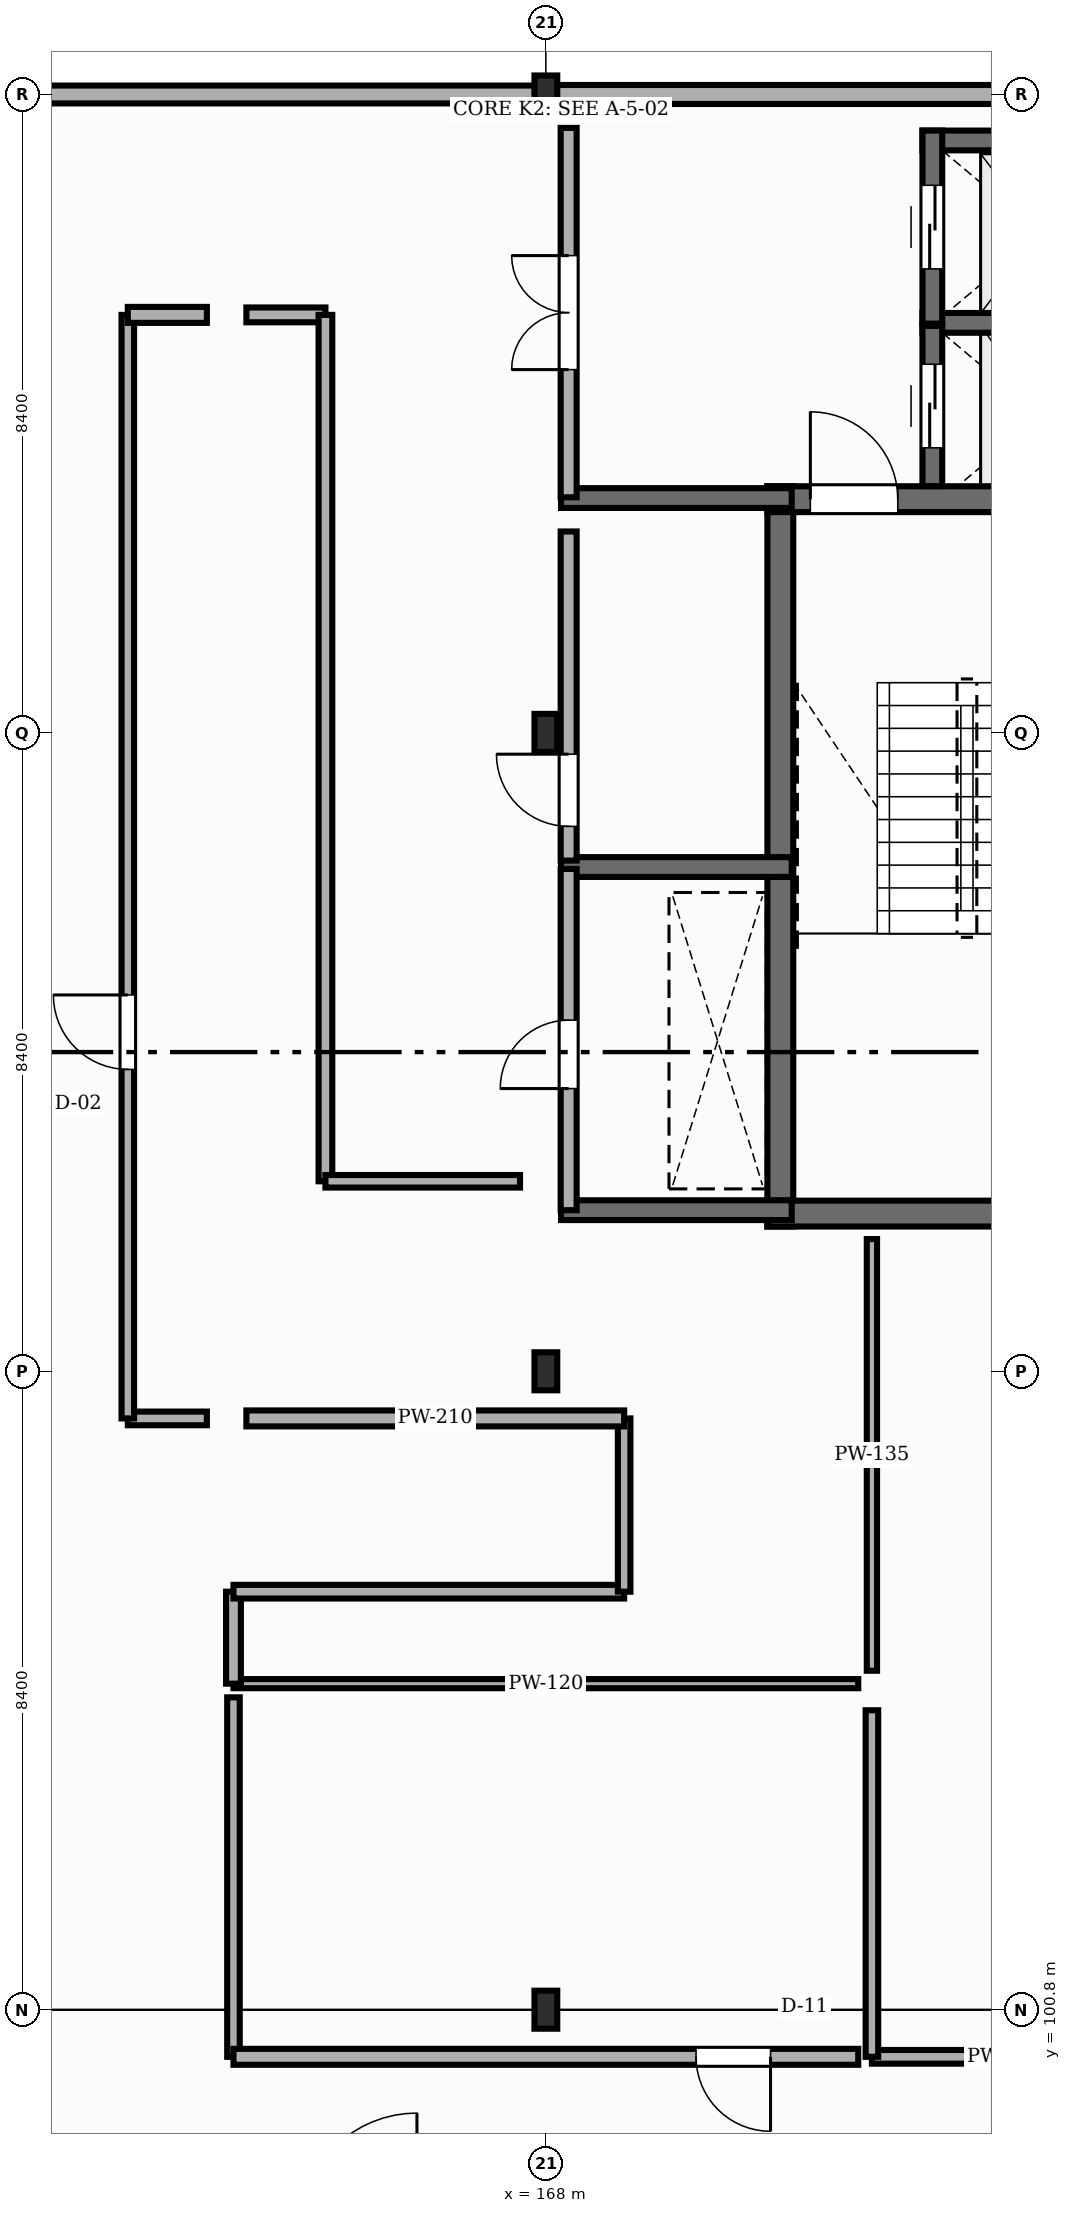
"""IFC4 building model, lengths in metres.
Left out: names, types, materials, properties, quantities, classifications, styles, units other than length and angle.
Written with IfcOpenShell. Run it as: python <this file> out.ifc"""

import sys

from ifc_helpers import new_model, si_unit, direction, frame, frame_2d, origin, origin_2d, place, context, subcontext, project, spatial, rectangle, i_section, extrude, element, fill, save


model = new_model("IFC4")
c1 = context("Model", 3, precision=1e-05, world=origin(), true_north=direction((0.0, 1.0)))
c2 = subcontext(c1, "Body", "Model", "MODEL_VIEW")
j1 = project(units=[si_unit("LENGTHUNIT", "METRE"), si_unit("PLANEANGLEUNIT", "RADIAN")], contexts=[c1])
p1 = place(None, origin())
s1 = spatial("IfcSite", under=j1, at=p1, CompositionType="ELEMENT")
p2 = place(p1, origin())
s2 = spatial("IfcBuilding", under=s1, at=p2, CompositionType="ELEMENT")
p3 = place(p2, frame((0.0, 0.0, 9.9)))
s3 = spatial("IfcBuildingStorey", under=s2, at=p3, CompositionType="ELEMENT", Elevation=9.9)
for number, where, z_axis, x_axis in (
    (1, (168.0, 100.8, 0.0), (0.0, 0.0, 1.0), (1.0, 0.0, 0.0)),
    (2, (168.0, 109.2, 0.0), (0.0, 0.0, 1.0), (1.0, 0.0, 0.0)),
    (3, (168.0, 117.6, 0.0), (0.0, 0.0, 1.0), (1.0, 0.0, 0.0)),
    (4, (168.0, 126.0, 0.0), (0.0, 0.0, 1.0), (1.0, 0.0, 0.0)),
):
    element("IfcColumn", number, at=place(p3, frame(where, z_axis=z_axis, x_axis=x_axis)), inside=s3, PredefinedType="COLUMN", context=c2, shape_type="SweptSolid", body=[
        extrude(i_section(OverallWidth=0.3, OverallDepth=0.5, WebThickness=0.014, FlangeThickness=0.028, FilletRadius=0.027, at=origin_2d()), origin(), (0.0, 0.0, 1.0), 4.05),
    ])
p4 = place(p3, frame((176.392, 126.0, 0.0), z_axis=(0.0, 0.0, 1.0), x_axis=(-1.0, 0.0, 0.0)))
e5 = element("IfcWall", 5, at=p4, inside=s3, PredefinedType="STANDARD", context=c2, shape_type="SweptSolid", body=[
    extrude(rectangle(XDim=8.384, YDim=0.25, at=frame_2d((4.192, 0.0))), origin(), (0.0, 0.0, 1.0), 3.502),
])
p5 = place(p3, frame((167.992, 126.0, 0.0), z_axis=(0.0, 0.0, 1.0), x_axis=(-1.0, 0.0, 0.0)))
e6 = element("IfcWall", 6, at=p5, inside=s3, PredefinedType="STANDARD", context=c2, shape_type="SweptSolid", body=[
    extrude(rectangle(XDim=8.384, YDim=0.235, at=frame_2d((4.192, 0.0))), origin(), (0.0, 0.0, 1.0), 3.472),
])
p6 = place(p3, frame((171.085, 111.105, 0.0), z_axis=(0.0, 0.0, 1.0), x_axis=(0.0, 1.0, 0.0)))
e7 = element("IfcWall", 7, at=p6, inside=s3, PredefinedType="SHEAR", context=c2, shape_type="SweptSolid", body=[
    extrude(rectangle(XDim=9.74, YDim=0.34, at=frame_2d((4.87, 0.0))), origin(), (0.0, 0.0, 1.0), 3.84),
])
p7 = place(p3, frame((170.915, 111.275, 0.0), z_axis=(0.0, 0.0, 1.0), x_axis=(1.0, 0.0, 0.0)))
e8 = element("IfcWall", 8, at=p7, inside=s3, PredefinedType="SHEAR", context=c2, shape_type="SweptSolid", body=[
    extrude(rectangle(XDim=5.25, YDim=0.34, at=frame_2d((2.625, 0.0))), origin(), (0.0, 0.0, 1.0), 3.84),
])
p8 = place(p3, frame((170.915, 120.675, 0.0), z_axis=(0.0, 0.0, 1.0), x_axis=(1.0, 0.0, 0.0)))
e9 = element("IfcWall", 9, at=p8, inside=s3, PredefinedType="SHEAR", context=c2, shape_type="SweptSolid", body=[
    extrude(rectangle(XDim=5.25, YDim=0.34, at=frame_2d((2.625, 0.0))), origin(), (0.0, 0.0, 1.0), 3.84),
])
p9 = place(p8, frame((0.565, 0.0, 0.0)))
e10 = element("IfcOpeningElement", 10, at=p9, cuts=e9, PredefinedType="OPENING", context=c2, shape_type="SweptSolid", body=[
    extrude(rectangle(XDim=1.15, YDim=2.15, at=frame_2d((0.575, 1.075))), frame((0.0, 0.18, 0.0), z_axis=(0.0, -1.0, 0.0), x_axis=(1.0, 0.0, 0.0)), (0.0, 0.0, 1.0), 0.36),
])
p10 = place(p3, frame((172.955, 122.995, 0.0), z_axis=(0.0, 0.0, 1.0), x_axis=(1.0, 0.0, 0.0)))
e11 = element("IfcWall", 11, at=p10, inside=s3, PredefinedType="SHEAR", context=c2, shape_type="SweptSolid", body=[
    extrude(rectangle(XDim=3.13, YDim=0.26, at=frame_2d((1.565, 0.0))), origin(), (0.0, 0.0, 1.0), 3.84),
])
p11 = place(p3, frame((173.085, 120.847, 0.0), z_axis=(0.0, 0.0, 1.0), x_axis=(0.0, 1.0, 0.0)))
e12 = element("IfcWall", 12, at=p11, inside=s3, PredefinedType="SHEAR", context=c2, shape_type="SweptSolid", body=[
    extrude(rectangle(XDim=2.108, YDim=0.26, at=frame_2d((1.054, 0.0))), origin(), (0.0, 0.0, 1.0), 3.84),
])
p12 = place(p11, frame((0.504, 0.0, 0.0)))
e13 = element("IfcOpeningElement", 13, at=p12, cuts=e12, PredefinedType="OPENING", context=c2, shape_type="SweptSolid", body=[
    extrude(rectangle(XDim=1.1, YDim=2.15, at=frame_2d((0.55, 1.075))), frame((0.0, 0.14, 0.0), z_axis=(0.0, -1.0, 0.0), x_axis=(1.0, 0.0, 0.0)), (0.0, 0.0, 1.0), 0.28),
])
p13 = place(p3, frame((172.955, 125.395, 0.0), z_axis=(0.0, 0.0, 1.0), x_axis=(1.0, 0.0, 0.0)))
e14 = element("IfcWall", 14, at=p13, inside=s3, PredefinedType="SHEAR", context=c2, shape_type="SweptSolid", body=[
    extrude(rectangle(XDim=3.13, YDim=0.26, at=frame_2d((1.565, 0.0))), origin(), (0.0, 0.0, 1.0), 3.84),
])
p14 = place(p3, frame((173.085, 122.985, 0.0), z_axis=(0.0, 0.0, 1.0), x_axis=(0.0, 1.0, 0.0)))
e15 = element("IfcWall", 15, at=p14, inside=s3, PredefinedType="SHEAR", context=c2, shape_type="SweptSolid", body=[
    extrude(rectangle(XDim=2.54, YDim=0.26, at=frame_2d((1.27, 0.0))), origin(), (0.0, 0.0, 1.0), 3.84),
])
p15 = place(p14, frame((0.72, 0.0, 0.0)))
e16 = element("IfcOpeningElement", 16, at=p15, cuts=e15, PredefinedType="OPENING", context=c2, shape_type="SweptSolid", body=[
    extrude(rectangle(XDim=1.1, YDim=2.15, at=frame_2d((0.55, 1.075))), frame((0.0, 0.14, 0.0), z_axis=(0.0, -1.0, 0.0), x_axis=(1.0, 0.0, 0.0)), (0.0, 0.0, 1.0), 0.28),
])
for number, where, z_axis, x_axis in (
    (17, (168.2, 111.32, 0.0), (0.0, 0.0, 1.0), (1.0, 0.0, 0.0)),
    (18, (168.2, 115.835, 0.0), (0.0, 0.0, 1.0), (1.0, 0.0, 0.0)),
    (19, (168.2, 120.69, 0.0), (0.0, 0.0, 1.0), (1.0, 0.0, 0.0)),
):
    element("IfcWall", number, at=place(p3, frame(where, z_axis=z_axis, x_axis=x_axis)), inside=s3, PredefinedType="SHEAR", context=c2, shape_type="SweptSolid", body=[
        extrude(rectangle(XDim=3.035, YDim=0.26, at=frame_2d((1.518, 0.0))), origin(), (0.0, 0.0, 1.0), 3.84),
    ])
p16 = place(p3, frame((168.3, 111.32, 0.0), z_axis=(0.0, 0.0, 1.0), x_axis=(0.0, 1.0, 0.0)))
e20 = element("IfcWall", 20, at=p16, inside=s3, PredefinedType="STANDARD", context=c2, shape_type="SweptSolid", body=[
    extrude(rectangle(XDim=4.49, YDim=0.21, at=frame_2d((2.245, 0.0))), origin(), (0.0, 0.0, 1.0), 3.432),
])
p17 = place(p16, frame((1.6, 0.0, 0.0)))
e21 = element("IfcOpeningElement", 21, at=p17, cuts=e20, PredefinedType="OPENING", context=c2, shape_type="SweptSolid", body=[
    extrude(rectangle(XDim=0.9, YDim=2.1, at=frame_2d((0.45, 1.05))), frame((0.0, 0.115, 0.0), z_axis=(0.0, -1.0, 0.0), x_axis=(1.0, 0.0, 0.0)), (0.0, 0.0, 1.0), 0.23),
])
p18 = place(p3, frame((168.3, 115.92, 0.0), z_axis=(0.0, 0.0, 1.0), x_axis=(0.0, 1.0, 0.0)))
e22 = element("IfcWall", 22, at=p18, inside=s3, PredefinedType="STANDARD", context=c2, shape_type="SweptSolid", body=[
    extrude(rectangle(XDim=4.33, YDim=0.21, at=frame_2d((2.165, 0.0))), origin(), (0.0, 0.0, 1.0), 3.432),
])
p19 = place(p18, frame((0.45, 0.0, 0.0)))
e23 = element("IfcOpeningElement", 23, at=p19, cuts=e22, PredefinedType="OPENING", context=c2, shape_type="SweptSolid", body=[
    extrude(rectangle(XDim=0.95, YDim=2.15, at=frame_2d((0.475, 1.075))), frame((0.0, 0.115, 0.0), z_axis=(0.0, -1.0, 0.0), x_axis=(1.0, 0.0, 0.0)), (0.0, 0.0, 1.0), 0.23),
])
p20 = place(p3, frame((168.3, 120.7, 0.0), z_axis=(0.0, 0.0, 1.0), x_axis=(0.0, 1.0, 0.0)))
e24 = element("IfcWall", 24, at=p20, inside=s3, PredefinedType="STANDARD", context=c2, shape_type="SweptSolid", body=[
    extrude(rectangle(XDim=4.86, YDim=0.21, at=frame_2d((2.43, 0.0))), origin(), (0.0, 0.0, 1.0), 3.482),
])
p21 = place(p20, frame((1.68, 0.0, 0.0)))
e25 = element("IfcOpeningElement", 25, at=p21, cuts=e24, PredefinedType="OPENING", context=c2, shape_type="SweptSolid", body=[
    extrude(rectangle(XDim=1.5, YDim=2.2, at=frame_2d((0.75, 1.1))), frame((0.0, 0.115, 0.0), z_axis=(0.0, -1.0, 0.0), x_axis=(1.0, 0.0, 0.0)), (0.0, 0.0, 1.0), 0.23),
])
p22 = place(p3, frame((175.78, 100.18, -0.004), z_axis=(0.0, 0.0, 1.0), x_axis=(-1.0, 0.0, 0.0)))
e26 = element("IfcWall", 26, at=p22, inside=s3, PredefinedType="STANDARD", context=c2, shape_type="SweptSolid", body=[
    extrude(rectangle(XDim=3.49, YDim=0.18, at=frame_2d((1.745, 0.0))), origin(), (0.0, 0.0, 1.0), 3.844),
])
p23 = place(p3, frame((172.29, 100.18, -0.004), z_axis=(0.0, 0.0, 1.0), x_axis=(0.0, 1.0, 0.0)))
e27 = element("IfcWall", 27, at=p23, inside=s3, PredefinedType="STANDARD", context=c2, shape_type="SweptSolid", body=[
    extrude(rectangle(XDim=4.56, YDim=0.165, at=frame_2d((2.28, 0.0))), origin(), (0.0, 0.0, 1.0), 3.844),
])
p24 = place(p3, frame((172.29, 105.26, -0.004), z_axis=(0.0, 0.0, 1.0), x_axis=(0.0, 1.0, 0.0)))
e28 = element("IfcWall", 28, at=p24, inside=s3, PredefinedType="STANDARD", context=c2, shape_type="SweptSolid", body=[
    extrude(rectangle(XDim=5.68, YDim=0.135, at=frame_2d((2.84, 0.0))), origin(), (0.0, 0.0, 1.0), 3.844),
])
p25 = place(p3, frame((163.54, 108.58, -0.004), z_axis=(0.0, 0.0, 1.0), x_axis=(-1.0, 0.0, 0.0)))
e29 = element("IfcWall", 29, at=p25, inside=s3, PredefinedType="STANDARD", context=c2, shape_type="SweptSolid", body=[
    extrude(rectangle(XDim=1.04, YDim=0.18, at=frame_2d((0.52, 0.0))), origin(), (0.0, 0.0, 1.0), 3.844),
])
p26 = place(p3, frame((162.5, 108.58, -0.004), z_axis=(0.0, 0.0, 1.0), x_axis=(0.0, 1.0, 0.0)))
e30 = element("IfcWall", 30, at=p26, inside=s3, PredefinedType="STANDARD", context=c2, shape_type="SweptSolid", body=[
    extrude(rectangle(XDim=14.52, YDim=0.165, at=frame_2d((7.26, 0.0))), origin(), (0.0, 0.0, 1.0), 3.536),
])
p27 = place(p26, frame((4.592, 0.0, 0.0)))
e31 = element("IfcOpeningElement", 31, at=p27, cuts=e30, PredefinedType="OPENING", context=c2, shape_type="SweptSolid", body=[
    extrude(rectangle(XDim=0.98, YDim=2.06, at=frame_2d((0.49, 1.03))), frame((0.0, 0.093, 0.0), z_axis=(0.0, -1.0, 0.0), x_axis=(1.0, 0.0, 0.0)), (0.0, 0.0, 1.0), 0.185),
])
p28 = place(p3, frame((162.5, 123.1, -0.004), z_axis=(0.0, 0.0, 1.0), x_axis=(1.0, 0.0, 0.0)))
e32 = element("IfcWall", 32, at=p28, inside=s3, PredefinedType="STANDARD", context=c2, shape_type="SweptSolid", body=[
    extrude(rectangle(XDim=1.04, YDim=0.21, at=frame_2d((0.52, 0.0))), origin(), (0.0, 0.0, 1.0), 3.844),
])
p29 = place(p3, frame((164.06, 123.1, -0.004), z_axis=(0.0, 0.0, 1.0), x_axis=(1.0, 0.0, 0.0)))
e33 = element("IfcWall", 33, at=p29, inside=s3, PredefinedType="STANDARD", context=c2, shape_type="SweptSolid", body=[
    extrude(rectangle(XDim=1.04, YDim=0.195, at=frame_2d((0.52, 0.0))), origin(), (0.0, 0.0, 1.0), 3.844),
])
p30 = place(p3, frame((165.1, 123.1, -0.004), z_axis=(0.0, 0.0, 1.0), x_axis=(0.0, -1.0, 0.0)))
e34 = element("IfcWall", 34, at=p30, inside=s3, PredefinedType="STANDARD", context=c2, shape_type="SweptSolid", body=[
    extrude(rectangle(XDim=11.4, YDim=0.18, at=frame_2d((5.7, 0.0))), origin(), (0.0, 0.0, 1.0), 3.536),
])
p31 = place(p3, frame((165.1, 111.7, -0.004), z_axis=(0.0, 0.0, 1.0), x_axis=(1.0, 0.0, 0.0)))
e35 = element("IfcWall", 35, at=p31, inside=s3, PredefinedType="STANDARD", context=c2, shape_type="SweptSolid", body=[
    extrude(rectangle(XDim=2.56, YDim=0.165, at=frame_2d((1.28, 0.0))), origin(), (0.0, 0.0, 1.0), 3.844),
])
p32 = place(p3, frame((172.11, 105.09, -0.004), z_axis=(0.0, 0.0, 1.0), x_axis=(-1.0, 0.0, 0.0)))
e36 = element("IfcWall", 36, at=p32, inside=s3, PredefinedType="STANDARD", context=c2, shape_type="SweptSolid", body=[
    extrude(rectangle(XDim=8.22, YDim=0.12, at=frame_2d((4.11, 0.0))), origin(), (0.0, 0.0, 1.0), 3.844),
])
p33 = place(p3, frame((163.89, 105.09, -0.004), z_axis=(0.0, 0.0, 1.0), x_axis=(0.0, 1.0, 0.0)))
e37 = element("IfcWall", 37, at=p33, inside=s3, PredefinedType="STANDARD", context=c2, shape_type="SweptSolid", body=[
    extrude(rectangle(XDim=1.21, YDim=0.195, at=frame_2d((0.605, 0.0))), origin(), (0.0, 0.0, 1.0), 3.844),
])
p34 = place(p3, frame((163.89, 106.3, -0.004), z_axis=(0.0, 0.0, 1.0), x_axis=(1.0, 0.0, 0.0)))
e38 = element("IfcWall", 38, at=p34, inside=s3, PredefinedType="STANDARD", context=c2, shape_type="SweptSolid", body=[
    extrude(rectangle(XDim=5.14, YDim=0.18, at=frame_2d((2.57, 0.0))), origin(), (0.0, 0.0, 1.0), 3.844),
])
p35 = place(p3, frame((169.03, 106.3, -0.004), z_axis=(0.0, 0.0, 1.0), x_axis=(0.0, 1.0, 0.0)))
e39 = element("IfcWall", 39, at=p35, inside=s3, PredefinedType="STANDARD", context=c2, shape_type="SweptSolid", body=[
    extrude(rectangle(XDim=2.28, YDim=0.165, at=frame_2d((1.14, 0.0))), origin(), (0.0, 0.0, 1.0), 3.844),
])
p36 = place(p3, frame((169.03, 108.58, -0.004), z_axis=(0.0, 0.0, 1.0), x_axis=(-1.0, 0.0, 0.0)))
e40 = element("IfcWall", 40, at=p36, inside=s3, PredefinedType="STANDARD", context=c2, shape_type="SweptSolid", body=[
    extrude(rectangle(XDim=4.97, YDim=0.21, at=frame_2d((2.485, 0.0))), origin(), (0.0, 0.0, 1.0), 3.844),
])
p37 = place(p3, frame((163.89, 100.18, -0.004), z_axis=(0.0, 0.0, 1.0), x_axis=(0.0, 1.0, 0.0)))
e41 = element("IfcWall", 41, at=p37, inside=s3, PredefinedType="STANDARD", context=c2, shape_type="SweptSolid", body=[
    extrude(rectangle(XDim=4.73, YDim=0.165, at=frame_2d((2.365, 0.0))), origin(), (0.0, 0.0, 1.0), 3.844),
])
p38 = place(p3, frame((172.11, 100.18, -0.004), z_axis=(0.0, 0.0, 1.0), x_axis=(-1.0, 0.0, 0.0)))
e42 = element("IfcWall", 42, at=p38, inside=s3, PredefinedType="STANDARD", context=c2, shape_type="SweptSolid", body=[
    extrude(rectangle(XDim=8.22, YDim=0.21, at=frame_2d((4.11, 0.0))), origin(), (0.0, 0.0, 1.0), 3.844),
])
p39 = place(p38, frame((1.154, 0.0, 0.0)))
e43 = element("IfcOpeningElement", 43, at=p39, cuts=e42, PredefinedType="OPENING", context=c2, shape_type="SweptSolid", body=[
    extrude(rectangle(XDim=0.98, YDim=2.14, at=frame_2d((0.49, 1.07))), frame((0.0, 0.115, 0.0), z_axis=(0.0, -1.0, 0.0), x_axis=(1.0, 0.0, 0.0)), (0.0, 0.0, 1.0), 0.23),
])
p40 = place(p9, origin())
e44 = element("IfcDoor", 44, at=p40, inside=s3, OperationType="SINGLE_SWING_LEFT", PredefinedType="DOOR", context=c2, shape_type="SweptSolid", body=[
    extrude(rectangle(XDim=1.15, YDim=2.15, at=frame_2d((0.575, 1.075))), frame((0.0, 0.025, 0.0), z_axis=(0.0, -1.0, 0.0), x_axis=(1.0, 0.0, 0.0)), (0.0, 0.0, 1.0), 0.05),
])
fill(e10, e44)
p41 = place(p12, origin())
e45 = element("IfcDoor", 45, at=p41, inside=s3, OperationType="DOUBLE_DOOR_SLIDING", PredefinedType="DOOR", context=c2, shape_type="SweptSolid", body=[
    extrude(rectangle(XDim=1.1, YDim=2.15, at=frame_2d((0.55, 1.075))), frame((0.0, 0.025, 0.0), z_axis=(0.0, -1.0, 0.0), x_axis=(1.0, 0.0, 0.0)), (0.0, 0.0, 1.0), 0.05),
])
fill(e13, e45)
p42 = place(p15, origin())
e46 = element("IfcDoor", 46, at=p42, inside=s3, OperationType="DOUBLE_DOOR_SLIDING", PredefinedType="DOOR", context=c2, shape_type="SweptSolid", body=[
    extrude(rectangle(XDim=1.1, YDim=2.15, at=frame_2d((0.55, 1.075))), frame((0.0, 0.025, 0.0), z_axis=(0.0, -1.0, 0.0), x_axis=(1.0, 0.0, 0.0)), (0.0, 0.0, 1.0), 0.05),
])
fill(e16, e46)
p43 = place(p17, origin())
e47 = element("IfcDoor", 47, at=p43, inside=s3, OperationType="SINGLE_SWING_LEFT", PredefinedType="DOOR", context=c2, shape_type="SweptSolid", body=[
    extrude(rectangle(XDim=0.9, YDim=2.1, at=frame_2d((0.45, 1.05))), frame((0.0, 0.025, 0.0), z_axis=(0.0, -1.0, 0.0), x_axis=(1.0, 0.0, 0.0)), (0.0, 0.0, 1.0), 0.05),
])
fill(e21, e47)
p44 = place(p19, origin())
e48 = element("IfcDoor", 48, at=p44, inside=s3, OperationType="SINGLE_SWING_RIGHT", PredefinedType="DOOR", context=c2, shape_type="SweptSolid", body=[
    extrude(rectangle(XDim=0.95, YDim=2.15, at=frame_2d((0.475, 1.075))), frame((0.0, 0.025, 0.0), z_axis=(0.0, -1.0, 0.0), x_axis=(1.0, 0.0, 0.0)), (0.0, 0.0, 1.0), 0.05),
])
fill(e23, e48)
p45 = place(p21, origin())
e49 = element("IfcDoor", 49, at=p45, inside=s3, OperationType="DOUBLE_DOOR_SINGLE_SWING", PredefinedType="DOOR", context=c2, shape_type="SweptSolid", body=[
    extrude(rectangle(XDim=1.5, YDim=2.2, at=frame_2d((0.75, 1.1))), frame((0.0, 0.025, 0.0), z_axis=(0.0, -1.0, 0.0), x_axis=(1.0, 0.0, 0.0)), (0.0, 0.0, 1.0), 0.05),
])
fill(e25, e49)
p46 = place(p27, origin())
e50 = element("IfcDoor", 50, at=p46, inside=s3, OperationType="SINGLE_SWING_RIGHT", PredefinedType="DOOR", context=c2, shape_type="SweptSolid", body=[
    extrude(rectangle(XDim=0.98, YDim=2.06, at=frame_2d((0.49, 1.03))), frame((0.0, 0.025, 0.0), z_axis=(0.0, -1.0, 0.0), x_axis=(1.0, 0.0, 0.0)), (0.0, 0.0, 1.0), 0.05),
])
fill(e31, e50)
p47 = place(p39, origin())
e51 = element("IfcDoor", 51, at=p47, inside=s3, OperationType="SINGLE_SWING_LEFT", PredefinedType="DOOR", context=c2, shape_type="SweptSolid", body=[
    extrude(rectangle(XDim=0.98, YDim=2.14, at=frame_2d((0.49, 1.07))), frame((0.0, 0.025, 0.0), z_axis=(0.0, -1.0, 0.0), x_axis=(1.0, 0.0, 0.0)), (0.0, 0.0, 1.0), 0.05),
])
fill(e43, e51)
save(model, sys.argv[1])
